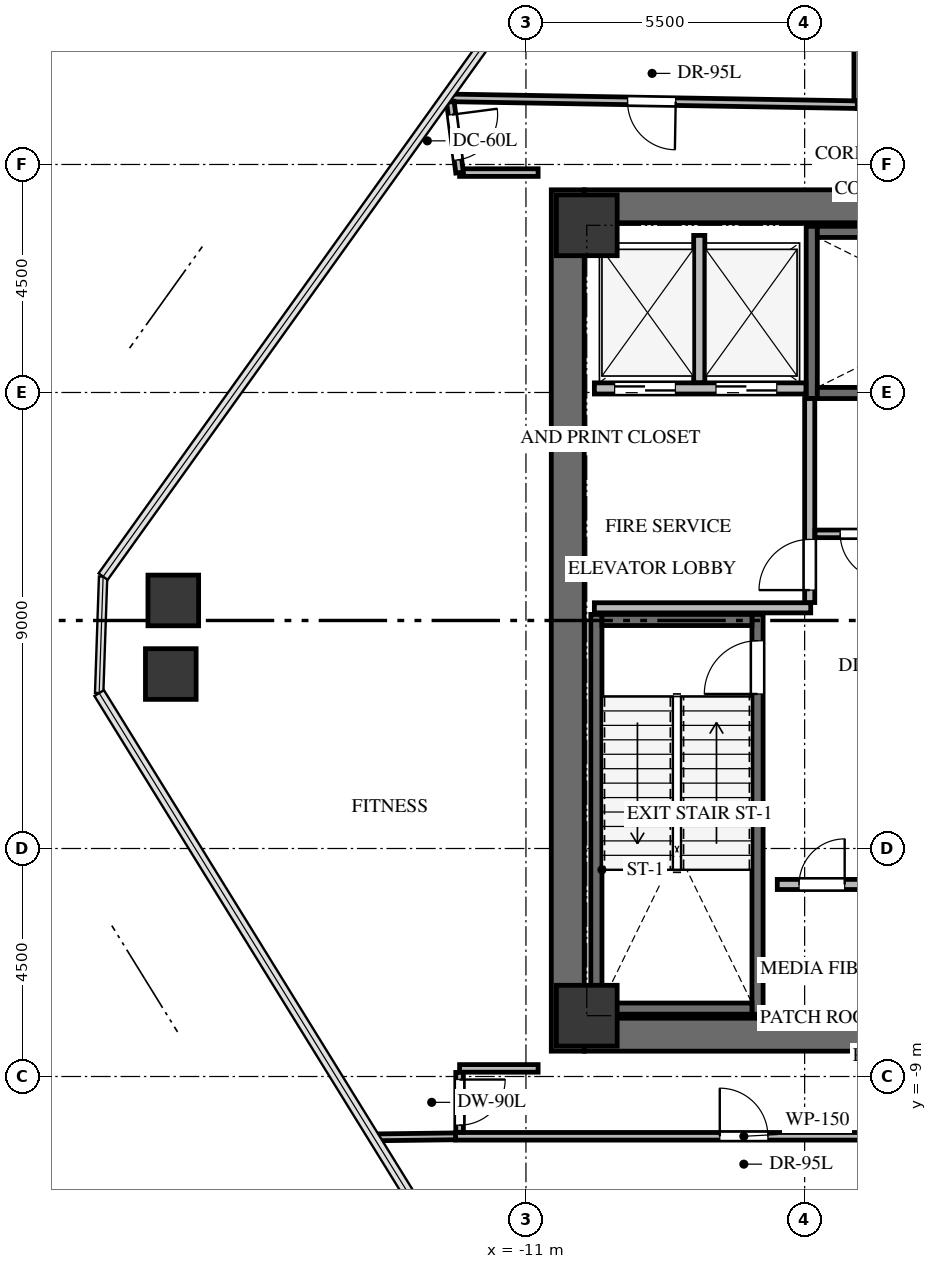
"""IFC4 building model, lengths in metres.
Left out: names, types, materials, properties, quantities, classifications, styles, units other than length and angle.
Written with IfcOpenShell. Run it as: python <this file> out.ifc"""

import sys

from ifc_helpers import new_model, si_unit, direction, frame, frame_2d, origin, origin_2d, place, context, subcontext, project, spatial, rectangle, extrude, source, transform, mapped, element, fill, save


model = new_model("IFC4")
c1 = context("Model", 3, precision=1e-05, world=origin(), true_north=direction((0.0, 1.0)))
c2 = subcontext(c1, "Body", "Model", "MODEL_VIEW")
j1 = project(units=[si_unit("LENGTHUNIT", "METRE"), si_unit("PLANEANGLEUNIT", "RADIAN")], contexts=[c1])
p1 = place(None, origin())
s1 = spatial("IfcSite", under=j1, at=p1, CompositionType="ELEMENT")
p2 = place(p1, origin())
s2 = spatial("IfcBuilding", under=s1, at=p2, CompositionType="ELEMENT")
p3 = place(p2, frame((0.0, 0.0, 162.6)))
s3 = spatial("IfcBuildingStorey", under=s2, at=p3, CompositionType="ELEMENT", Elevation=162.6)
p4 = place(p3, frame((-10.175, -8.5, 0.0), z_axis=(0.0, 0.0, 1.0), x_axis=(0.0, 1.0, 0.0)))
e1 = element("IfcWall", 1, at=p4, inside=s3, PredefinedType="SHEAR", context=c2, shape_type="SweptSolid", body=[
    extrude(rectangle(XDim=17.0, YDim=0.65, at=frame_2d((8.5, 0.0))), origin(), (0.0, 0.0, 1.0), 4.6),
])
p5 = place(p3, frame((-9.85, -8.175, 0.0), z_axis=(0.0, 0.0, 1.0), x_axis=(1.0, 0.0, 0.0)))
e2 = element("IfcWall", 2, at=p5, inside=s3, PredefinedType="SHEAR", context=c2, shape_type="SweptSolid", body=[
    extrude(rectangle(XDim=7.75, YDim=0.65, at=frame_2d((3.875, 0.0))), origin(), (0.0, 0.0, 1.0), 4.6),
])
p6 = place(p3, frame((-9.85, 8.175, 0.0), z_axis=(0.0, 0.0, 1.0), x_axis=(1.0, 0.0, 0.0)))
e3 = element("IfcWall", 3, at=p6, inside=s3, PredefinedType="SHEAR", context=c2, shape_type="SweptSolid", body=[
    extrude(rectangle(XDim=19.7, YDim=0.65, at=frame_2d((9.85, 0.0))), origin(), (0.0, 0.0, 1.0), 4.6),
])
p7 = place(p3, frame((-6.43, -7.77, -0.32), z_axis=(0.0, 0.0, 1.0), x_axis=(0.0, 1.0, 0.0)))
e4 = element("IfcWall", 4, at=p7, inside=s3, PredefinedType="SHEAR", context=c2, shape_type="SweptSolid", body=[
    extrude(rectangle(XDim=7.89, YDim=0.22, at=frame_2d((3.945, 0.0))), origin(), (0.0, 0.0, 1.0), 4.68),
])
p8 = place(p7, frame((6.32, 0.0, 0.0)))
e5 = element("IfcOpeningElement", 5, at=p8, cuts=e4, PredefinedType="OPENING", context=c2, shape_type="SweptSolid", body=[
    extrude(rectangle(XDim=1.05, YDim=2.15, at=frame_2d((0.525, 1.075))), frame((0.0, 0.12, 0.0), z_axis=(0.0, -1.0, 0.0), x_axis=(1.0, 0.0, 0.0)), (0.0, 0.0, 1.0), 0.24),
])
p9 = place(p3, frame((-9.61, 0.12, -0.32), z_axis=(0.0, 0.0, 1.0), x_axis=(0.0, -1.0, 0.0)))
e6 = element("IfcWall", 6, at=p9, inside=s3, PredefinedType="SHEAR", context=c2, shape_type="SweptSolid", body=[
    extrude(rectangle(XDim=7.89, YDim=0.22, at=frame_2d((3.945, 0.0))), origin(), (0.0, 0.0, 1.0), 4.68),
])
for number, where, z_axis, x_axis in (
    (7, (-9.5, -7.66, -0.32), (0.0, 0.0, 1.0), (1.0, 0.0, 0.0)),
    (8, (-6.54, 0.01, -0.32), (0.0, 0.0, 1.0), (-1.0, 0.0, 0.0)),
):
    element("IfcWall", number, at=place(p3, frame(where, z_axis=z_axis, x_axis=x_axis)), inside=s3, PredefinedType="SHEAR", context=c2, shape_type="SweptSolid", body=[
        extrude(rectangle(XDim=2.96, YDim=0.22, at=frame_2d((1.48, 0.0))), origin(), (0.0, 0.0, 1.0), 4.68),
    ])
p10 = place(p3, frame((-5.36, 7.78, -0.32), z_axis=(0.0, 0.0, 1.0), x_axis=(0.0, -1.0, 0.0)))
e9 = element("IfcWall", 9, at=p10, inside=s3, PredefinedType="SHEAR", context=c2, shape_type="SweptSolid", body=[
    extrude(rectangle(XDim=3.4, YDim=0.22, at=frame_2d((1.7, 0.0))), origin(), (0.0, 0.0, 1.0), 4.68),
])
p11 = place(p3, frame((-5.25, 4.49, -0.32), z_axis=(0.0, 0.0, 1.0), x_axis=(1.0, 0.0, 0.0)))
e10 = element("IfcWall", 10, at=p11, inside=s3, PredefinedType="SHEAR", context=c2, shape_type="SweptSolid", body=[
    extrude(rectangle(XDim=7.35, YDim=0.22, at=frame_2d((3.675, 0.0))), origin(), (0.0, 0.0, 1.0), 4.68),
])
p12 = place(p11, frame((5.85, 0.0, 0.0)))
e11 = element("IfcOpeningElement", 11, at=p12, cuts=e10, PredefinedType="OPENING", context=c2, shape_type="SweptSolid", body=[
    extrude(rectangle(XDim=1.05, YDim=2.15, at=frame_2d((0.525, 1.075))), frame((0.0, 0.12, 0.0), z_axis=(0.0, -1.0, 0.0), x_axis=(1.0, 0.0, 0.0)), (0.0, 0.0, 1.0), 0.24),
])
p13 = place(p3, frame((2.1, 7.67, -0.32), z_axis=(0.0, 0.0, 1.0), x_axis=(-1.0, 0.0, 0.0)))
e12 = element("IfcWall", 12, at=p13, inside=s3, PredefinedType="SHEAR", context=c2, shape_type="SweptSolid", body=[
    extrude(rectangle(XDim=7.35, YDim=0.22, at=frame_2d((3.675, 0.0))), origin(), (0.0, 0.0, 1.0), 4.68),
])
m1 = source(origin(), c2, "Body", "SweptSolid", [
    extrude(rectangle(XDim=1.2, YDim=1.2, at=origin_2d()), origin(), (0.0, 0.0, 1.0), 4.68),
])
for number, where, z_axis, x_axis in (
    (13, (-9.8, -7.8, -0.32), (0.0, 0.0, 1.0), (1.0, 0.0, 0.0)),
    (14, (-9.8, 7.8, -0.32), (0.0, 0.0, 1.0), (1.0, 0.0, 0.0)),
):
    element("IfcColumn", number, at=place(p3, frame(where, z_axis=z_axis, x_axis=x_axis)), inside=s3, PredefinedType="COLUMN", context=c2, shape_type="MappedRepresentation", body=[
        mapped(m1, transform((0.0, 0.0, 0.0), x_axis=(1.0, 0.0, 0.0), y_axis=(0.0, 1.0, 0.0), z_axis=(0.0, 0.0, 1.0), scale=1.0)),
    ])
m2 = source(origin(), c2, "Body", "SweptSolid", [
    extrude(rectangle(XDim=1.0, YDim=1.0, at=origin_2d()), origin(), (0.0, 0.0, 1.0), 4.68),
])
for number, where, z_axis, x_axis in (
    (15, (-18.009, -1.057, -0.32), (0.0, 0.0, 1.0), (1.0, 0.0, 0.0)),
    (16, (-17.96, 0.396, -0.32), (0.0, 0.0, 1.0), (1.0, 0.0, 0.0)),
):
    element("IfcColumn", number, at=place(p3, frame(where, z_axis=z_axis, x_axis=x_axis)), inside=s3, PredefinedType="COLUMN", context=c2, shape_type="MappedRepresentation", body=[
        mapped(m2, transform((0.0, 0.0, 0.0), x_axis=(1.0, 0.0, 0.0), y_axis=(0.0, 1.0, 0.0), z_axis=(0.0, 0.0, 1.0), scale=1.0)),
    ])
p14 = place(p3, frame((-9.65, 4.58, 0.0), z_axis=(0.0, 0.0, 1.0), x_axis=(1.0, 0.0, 0.0)))
e17 = element("IfcWall", 17, at=p14, inside=s3, PredefinedType="SOLIDWALL", context=c2, shape_type="SweptSolid", body=[
    extrude(rectangle(XDim=4.175, YDim=0.22, at=frame_2d((2.087, 0.0))), origin(), (0.0, 0.0, 1.0), 4.345),
])
p15 = place(p14, frame((0.4, 0.0, 0.0)))
e18 = element("IfcOpeningElement", 18, at=p15, cuts=e17, PredefinedType="OPENING", context=c2, shape_type="SweptSolid", body=[
    extrude(rectangle(XDim=1.2, YDim=2.15, at=frame_2d((0.6, 1.075))), frame((0.0, 0.12, 0.0), z_axis=(0.0, -1.0, 0.0), x_axis=(1.0, 0.0, 0.0)), (0.0, 0.0, 1.0), 0.24),
])
p16 = place(p14, frame((2.4, 0.0, 0.0)))
e19 = element("IfcOpeningElement", 19, at=p16, cuts=e17, PredefinedType="OPENING", context=c2, shape_type="SweptSolid", body=[
    extrude(rectangle(XDim=1.2, YDim=2.15, at=frame_2d((0.6, 1.075))), frame((0.0, 0.12, 0.0), z_axis=(0.0, -1.0, 0.0), x_axis=(1.0, 0.0, 0.0)), (0.0, 0.0, 1.0), 0.24),
])
p17 = place(p3, frame((-7.58, 4.694, 0.0), z_axis=(0.0, 0.0, 1.0), x_axis=(0.0, 1.0, 0.0)))
e20 = element("IfcWall", 20, at=p17, inside=s3, PredefinedType="SOLIDWALL", context=c2, shape_type="SweptSolid", body=[
    extrude(rectangle(XDim=2.906, YDim=0.22, at=frame_2d((1.453, 0.0))), origin(), (0.0, 0.0, 1.0), 4.345),
])
p18 = place(p3, frame((-9.65, 0.25, 0.0), z_axis=(0.0, 0.0, 1.0), x_axis=(1.0, 0.0, 0.0)))
e21 = element("IfcWall", 21, at=p18, inside=s3, PredefinedType="SOLIDWALL", context=c2, shape_type="SweptSolid", body=[
    extrude(rectangle(XDim=4.27, YDim=0.2, at=frame_2d((2.135, 0.0))), origin(), (0.0, 0.0, 1.0), 4.345),
])
p19 = place(p3, frame((-5.4, 0.354, 0.0), z_axis=(0.0, 0.0, 1.0), x_axis=(0.0, 1.0, 0.0)))
e22 = element("IfcWall", 22, at=p19, inside=s3, PredefinedType="SOLIDWALL", context=c2, shape_type="SweptSolid", body=[
    extrude(rectangle(XDim=4.026, YDim=0.2, at=frame_2d((2.013, 0.0))), origin(), (0.0, 0.0, 1.0), 4.345),
])
p20 = place(p19, frame((0.246, 0.0, 0.0)))
e23 = element("IfcOpeningElement", 23, at=p20, cuts=e22, PredefinedType="OPENING", context=c2, shape_type="SweptSolid", body=[
    extrude(rectangle(XDim=1.0, YDim=2.15, at=frame_2d((0.5, 1.075))), frame((0.0, 0.11, 0.0), z_axis=(0.0, -1.0, 0.0), x_axis=(1.0, 0.0, 0.0)), (0.0, 0.0, 1.0), 0.22),
])
p21 = place(p3, frame((-6.04, -5.21, 0.0), z_axis=(0.0, 0.0, 1.0), x_axis=(1.0, 0.0, 0.0)))
e24 = element("IfcWall", 24, at=p21, inside=s3, PredefinedType="SOLIDWALL", context=c2, shape_type="SweptSolid", body=[
    extrude(rectangle(XDim=1.76, YDim=0.2, at=frame_2d((0.88, 0.0))), origin(), (0.0, 0.0, 1.0), 4.345),
])
p22 = place(p21, frame((0.43, 0.0, 0.0)))
e25 = element("IfcOpeningElement", 25, at=p22, cuts=e24, PredefinedType="OPENING", context=c2, shape_type="SweptSolid", body=[
    extrude(rectangle(XDim=0.9, YDim=2.05, at=frame_2d((0.45, 1.025))), frame((0.0, 0.11, 0.0), z_axis=(0.0, -1.0, 0.0), x_axis=(1.0, 0.0, 0.0)), (0.0, 0.0, 1.0), 0.22),
])
p23 = place(p3, frame((-3.4, 1.71, 0.0), z_axis=(0.0, 0.0, 1.0), x_axis=(-1.0, 0.0, 0.0)))
e26 = element("IfcWall", 26, at=p23, inside=s3, PredefinedType="PARTITIONING", context=c2, shape_type="SweptSolid", body=[
    extrude(rectangle(XDim=1.896, YDim=0.15, at=frame_2d((0.948, 0.0))), origin(), (0.0, 0.0, 1.0), 4.345),
])
p24 = place(p23, frame((0.498, 0.0, 0.0)))
e27 = element("IfcOpeningElement", 27, at=p24, cuts=e26, PredefinedType="OPENING", context=c2, shape_type="SweptSolid", body=[
    extrude(rectangle(XDim=0.9, YDim=2.05, at=frame_2d((0.45, 1.025))), frame((0.0, 0.085, 0.0), z_axis=(0.0, -1.0, 0.0), x_axis=(1.0, 0.0, 0.0)), (0.0, 0.0, 1.0), 0.17),
])
p25 = place(p3, frame((-4.46, 10.18, 0.0), z_axis=(0.0, 0.0, 1.0), x_axis=(-0.999860278764, 0.016715948973, 0.0)))
e28 = element("IfcWall", 28, at=p25, inside=s3, PredefinedType="PARTITIONING", context=c2, shape_type="SweptSolid", body=[
    extrude(rectangle(XDim=8.121, YDim=0.15, at=frame_2d((4.06, 0.0))), origin(), (0.0, 0.0, 1.0), 3.542),
])
p26 = place(p25, frame((3.585, 0.0, 0.0)))
e29 = element("IfcOpeningElement", 29, at=p26, cuts=e28, PredefinedType="OPENING", context=c2, shape_type="SweptSolid", body=[
    extrude(rectangle(XDim=0.95, YDim=2.1, at=frame_2d((0.475, 1.05))), frame((0.0, 0.085, 0.0), z_axis=(0.0, -1.0, 0.0), x_axis=(1.0, 0.0, 0.0)), (0.0, 0.0, 1.0), 0.17),
])
p27 = place(p3, frame((-1.089, 10.18, 0.0), z_axis=(0.0, 0.0, 1.0), x_axis=(-1.0, 0.0, 0.0)))
e30 = element("IfcWall", 30, at=p27, inside=s3, PredefinedType="PARTITIONING", context=c2, shape_type="SweptSolid", body=[
    extrude(rectangle(XDim=3.371, YDim=0.15, at=frame_2d((1.686, 0.0))), origin(), (0.0, 0.0, 1.0), 3.908),
])
p28 = place(p3, frame((-12.39, -10.18, 0.0), z_axis=(0.0, 0.0, 1.0), x_axis=(1.0, 0.0, 0.0)))
e31 = element("IfcWall", 31, at=p28, inside=s3, PredefinedType="PARTITIONING", context=c2, shape_type="SweptSolid", body=[
    extrude(rectangle(XDim=11.38, YDim=0.15, at=frame_2d((5.69, 0.0))), origin(), (0.0, 0.0, 1.0), 3.542),
])
p29 = place(p28, frame((5.215, 0.0, 0.0)))
e32 = element("IfcOpeningElement", 32, at=p29, cuts=e31, PredefinedType="OPENING", context=c2, shape_type="SweptSolid", body=[
    extrude(rectangle(XDim=0.95, YDim=2.1, at=frame_2d((0.475, 1.05))), frame((0.0, 0.085, 0.0), z_axis=(0.0, -1.0, 0.0), x_axis=(1.0, 0.0, 0.0)), (0.0, 0.0, 1.0), 0.17),
])
p30 = place(p3, frame((-10.76, -8.84, 0.0), z_axis=(0.0, 0.0, 1.0), x_axis=(-1.0, 0.0, 0.0)))
e33 = element("IfcWall", 33, at=p30, inside=s3, PredefinedType="PARTITIONING", context=c2, shape_type="SweptSolid", body=[
    extrude(rectangle(XDim=1.55, YDim=0.15, at=frame_2d((0.775, 0.0))), origin(), (0.0, 0.0, 1.0), 4.345),
])
p31 = place(p3, frame((-12.31, -8.919, 0.0), z_axis=(0.0, 0.0, 1.0), x_axis=(0.0, -1.0, 0.0)))
e34 = element("IfcWall", 34, at=p31, inside=s3, PredefinedType="PARTITIONING", context=c2, shape_type="SweptSolid", body=[
    extrude(rectangle(XDim=1.182, YDim=0.15, at=frame_2d((0.591, 0.0))), origin(), (0.0, 0.0, 1.0), 3.699),
])
p32 = place(p31, frame((0.141, 0.0, 0.0)))
e35 = element("IfcOpeningElement", 35, at=p32, cuts=e34, PredefinedType="OPENING", context=c2, shape_type="SweptSolid", body=[
    extrude(rectangle(XDim=0.9, YDim=2.05, at=frame_2d((0.45, 1.025))), frame((0.0, 0.085, 0.0), z_axis=(0.0, -1.0, 0.0), x_axis=(1.0, 0.0, 0.0)), (0.0, 0.0, 1.0), 0.17),
])
p33 = place(p3, frame((-12.31, 8.84, 0.0), z_axis=(0.0, 0.0, 1.0), x_axis=(1.0, 0.0, 0.0)))
e36 = element("IfcWall", 36, at=p33, inside=s3, PredefinedType="PARTITIONING", context=c2, shape_type="SweptSolid", body=[
    extrude(rectangle(XDim=1.55, YDim=0.15, at=frame_2d((0.775, 0.0))), origin(), (0.0, 0.0, 1.0), 3.699),
])
p34 = place(p3, frame((-12.492, 10.235, 0.0), z_axis=(0.0, 0.0, 1.0), x_axis=(0.129457884372, -0.991584921312, 0.0)))
e37 = element("IfcWall", 37, at=p34, inside=s3, PredefinedType="PARTITIONING", context=c2, shape_type="SweptSolid", body=[
    extrude(rectangle(XDim=1.407, YDim=0.15, at=frame_2d((0.703, 0.0))), origin(), (0.0, 0.0, 1.0), 4.345),
])
p35 = place(p34, frame((0.253, 0.0, 0.0)))
e38 = element("IfcOpeningElement", 38, at=p35, cuts=e37, PredefinedType="OPENING", context=c2, shape_type="SweptSolid", body=[
    extrude(rectangle(XDim=0.9, YDim=2.05, at=frame_2d((0.45, 1.025))), frame((0.0, 0.085, 0.0), z_axis=(0.0, -1.0, 0.0), x_axis=(1.0, 0.0, 0.0)), (0.0, 0.0, 1.0), 0.17),
])
p36 = place(p3, frame((-4.46, 16.418, 0.0), z_axis=(0.0, 0.0, 1.0), x_axis=(0.0, -1.0, 0.0)))
e39 = element("IfcWall", 39, at=p36, inside=s3, PredefinedType="PARTITIONING", context=c2, shape_type="SweptSolid", body=[
    extrude(rectangle(XDim=6.159, YDim=0.135, at=frame_2d((3.08, 0.0))), origin(), (0.0, 0.0, 1.0), 3.699),
])
p37 = place(p3, frame((-14.004, -10.201, 0.0), z_axis=(0.0, 0.0, 1.0), x_axis=(0.999923084603, 0.012402615782, 0.0)))
e40 = element("IfcWall", 40, at=p37, inside=s3, PredefinedType="PARTITIONING", context=c2, shape_type="SweptSolid", body=[
    extrude(rectangle(XDim=1.614, YDim=0.135, at=frame_2d((0.807, 0.0))), origin(), (0.0, 0.0, 1.0), 3.699),
])
m3 = source(origin(), c2, "Body", "SweptSolid", [
    extrude(rectangle(XDim=1.05, YDim=2.15, at=frame_2d((0.525, 1.075))), frame((0.0, 0.025, 0.0), z_axis=(0.0, -1.0, 0.0), x_axis=(1.0, 0.0, 0.0)), (0.0, 0.0, 1.0), 0.05),
])
p38 = place(p8, origin())
e41 = element("IfcDoor", 41, at=p38, inside=s3, OperationType="SINGLE_SWING_LEFT", PredefinedType="DOOR", context=c2, shape_type="MappedRepresentation", body=[
    mapped(m3, transform((0.0, 0.0, 0.0), x_axis=(1.0, 0.0, 0.0), y_axis=(0.0, 1.0, 0.0), z_axis=(0.0, 0.0, 1.0), scale=1.0)),
])
fill(e5, e41)
m4 = source(origin(), c2, "Body", "SweptSolid", [
    extrude(rectangle(XDim=1.2, YDim=2.15, at=frame_2d((0.6, 1.075))), frame((0.0, 0.025, 0.0), z_axis=(0.0, -1.0, 0.0), x_axis=(1.0, 0.0, 0.0)), (0.0, 0.0, 1.0), 0.05),
])
p39 = place(p15, origin())
e42 = element("IfcDoor", 42, at=p39, inside=s3, OperationType="DOUBLE_DOOR_SLIDING", PredefinedType="DOOR", context=c2, shape_type="MappedRepresentation", body=[
    mapped(m4, transform((0.0, 0.0, 0.0), x_axis=(1.0, 0.0, 0.0), y_axis=(0.0, 1.0, 0.0), z_axis=(0.0, 0.0, 1.0), scale=1.0)),
])
fill(e18, e42)
p40 = place(p16, origin())
e43 = element("IfcDoor", 43, at=p40, inside=s3, OperationType="DOUBLE_DOOR_SLIDING", PredefinedType="DOOR", context=c2, shape_type="MappedRepresentation", body=[
    mapped(m4, transform((0.0, 0.0, 0.0), x_axis=(1.0, 0.0, 0.0), y_axis=(0.0, 1.0, 0.0), z_axis=(0.0, 0.0, 1.0), scale=1.0)),
])
fill(e19, e43)
m5 = source(origin(), c2, "Body", "SweptSolid", [
    extrude(rectangle(XDim=1.0, YDim=2.15, at=frame_2d((0.5, 1.075))), frame((0.0, 0.025, 0.0), z_axis=(0.0, -1.0, 0.0), x_axis=(1.0, 0.0, 0.0)), (0.0, 0.0, 1.0), 0.05),
])
p41 = place(p20, origin())
e44 = element("IfcDoor", 44, at=p41, inside=s3, OperationType="SINGLE_SWING_LEFT", PredefinedType="DOOR", context=c2, shape_type="MappedRepresentation", body=[
    mapped(m5, transform((0.0, 0.0, 0.0), x_axis=(1.0, 0.0, 0.0), y_axis=(0.0, 1.0, 0.0), z_axis=(0.0, 0.0, 1.0), scale=1.0)),
])
fill(e23, e44)
m6 = source(origin(), c2, "Body", "SweptSolid", [
    extrude(rectangle(XDim=0.9, YDim=2.05, at=frame_2d((0.45, 1.025))), frame((0.0, 0.025, 0.0), z_axis=(0.0, -1.0, 0.0), x_axis=(1.0, 0.0, 0.0)), (0.0, 0.0, 1.0), 0.05),
])
p42 = place(p22, origin())
e45 = element("IfcDoor", 45, at=p42, inside=s3, OperationType="SINGLE_SWING_RIGHT", PredefinedType="DOOR", context=c2, shape_type="MappedRepresentation", body=[
    mapped(m6, transform((0.0, 0.0, 0.0), x_axis=(1.0, 0.0, 0.0), y_axis=(0.0, 1.0, 0.0), z_axis=(0.0, 0.0, 1.0), scale=1.0)),
])
fill(e25, e45)
m7 = source(origin(), c2, "Body", "SweptSolid", [
    extrude(rectangle(XDim=0.9, YDim=2.05, at=frame_2d((0.45, 1.025))), frame((0.0, 0.025, 0.0), z_axis=(0.0, -1.0, 0.0), x_axis=(1.0, 0.0, 0.0)), (0.0, 0.0, 1.0), 0.05),
])
p43 = place(p24, origin())
e46 = element("IfcDoor", 46, at=p43, inside=s3, OperationType="SINGLE_SWING_LEFT", PredefinedType="DOOR", context=c2, shape_type="MappedRepresentation", body=[
    mapped(m7, transform((0.0, 0.0, 0.0), x_axis=(1.0, 0.0, 0.0), y_axis=(0.0, 1.0, 0.0), z_axis=(0.0, 0.0, 1.0), scale=1.0)),
])
fill(e27, e46)
m8 = source(origin(), c2, "Body", "SweptSolid", [
    extrude(rectangle(XDim=0.95, YDim=2.1, at=frame_2d((0.475, 1.05))), frame((0.0, 0.025, 0.0), z_axis=(0.0, -1.0, 0.0), x_axis=(1.0, 0.0, 0.0)), (0.0, 0.0, 1.0), 0.05),
])
p44 = place(p26, origin())
e47 = element("IfcDoor", 47, at=p44, inside=s3, OperationType="SINGLE_SWING_LEFT", PredefinedType="DOOR", context=c2, shape_type="MappedRepresentation", body=[
    mapped(m8, transform((0.0, 0.0, 0.0), x_axis=(1.0, 0.0, 0.0), y_axis=(0.0, 1.0, 0.0), z_axis=(0.0, 0.0, 1.0), scale=1.0)),
])
fill(e29, e47)
p45 = place(p29, origin())
e48 = element("IfcDoor", 48, at=p45, inside=s3, OperationType="SINGLE_SWING_LEFT", PredefinedType="DOOR", context=c2, shape_type="MappedRepresentation", body=[
    mapped(m8, transform((0.0, 0.0, 0.0), x_axis=(1.0, 0.0, 0.0), y_axis=(0.0, 1.0, 0.0), z_axis=(0.0, 0.0, 1.0), scale=1.0)),
])
fill(e32, e48)
m9 = source(origin(), c2, "Body", "SweptSolid", [
    extrude(rectangle(XDim=0.9, YDim=2.05, at=frame_2d((0.45, 1.025))), frame((0.0, 0.025, 0.0), z_axis=(0.0, -1.0, 0.0), x_axis=(1.0, 0.0, 0.0)), (0.0, 0.0, 1.0), 0.05),
])
p46 = place(p32, origin())
e49 = element("IfcDoor", 49, at=p46, inside=s3, OperationType="SINGLE_SWING_LEFT", PredefinedType="DOOR", context=c2, shape_type="MappedRepresentation", body=[
    mapped(m9, transform((0.0, 0.0, 0.0), x_axis=(1.0, 0.0, 0.0), y_axis=(0.0, 1.0, 0.0), z_axis=(0.0, 0.0, 1.0), scale=1.0)),
])
fill(e35, e49)
p47 = place(p35, origin())
e50 = element("IfcDoor", 50, at=p47, inside=s3, OperationType="SINGLE_SWING_LEFT", PredefinedType="DOOR", context=c2, shape_type="MappedRepresentation", body=[
    mapped(m7, transform((0.0, 0.0, 0.0), x_axis=(1.0, 0.0, 0.0), y_axis=(0.0, 1.0, 0.0), z_axis=(0.0, 0.0, 1.0), scale=1.0)),
])
fill(e38, e50)
save(model, sys.argv[1])
